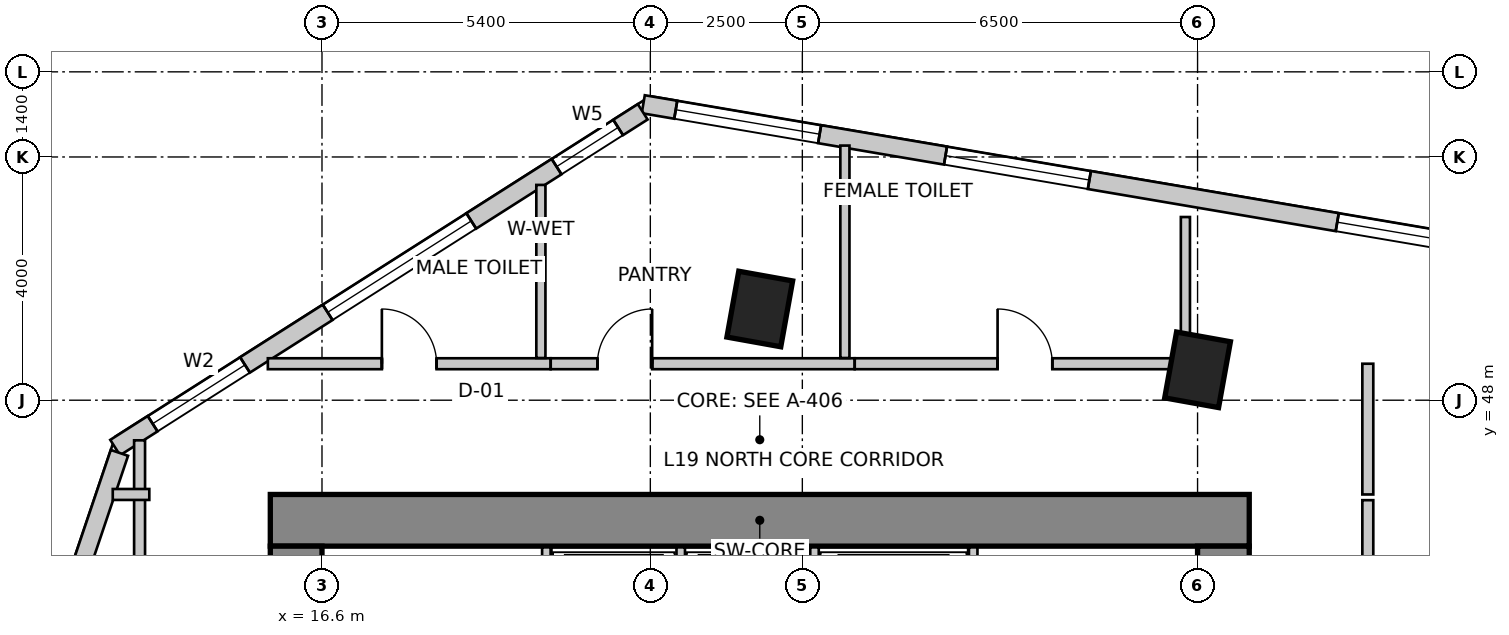
"""IFC4 building model, lengths in metres.
Left out: names, types, materials, properties, quantities, classifications, styles, units other than length and angle.
Written with IfcOpenShell. Run it as: python <this file> out.ifc"""

import sys

from ifc_helpers import new_model, si_unit, direction, frame, frame_2d, origin, origin_2d, place, context, subcontext, project, spatial, rectangle, extrude, source, transform, mapped, element, fill, save


model = new_model("IFC4")
c1 = context("Model", 3, precision=1e-05, world=origin(), true_north=direction((0.0, 1.0)))
c2 = subcontext(c1, "Body", "Model", "MODEL_VIEW")
j1 = project(units=[si_unit("LENGTHUNIT", "METRE"), si_unit("PLANEANGLEUNIT", "RADIAN")], contexts=[c1])
p1 = place(None, origin())
s1 = spatial("IfcSite", under=j1, at=p1, CompositionType="ELEMENT")
p2 = place(p1, origin())
s2 = spatial("IfcBuilding", under=s1, at=p2, CompositionType="ELEMENT")
p3 = place(p2, frame((0.0, 0.0, 79.0)))
s3 = spatial("IfcBuildingStorey", under=s2, at=p3, CompositionType="ELEMENT", Elevation=79.0)
p4 = place(p3, frame((15.75, 46.025, 0.0), z_axis=(0.0, 0.0, 1.0), x_axis=(1.0, 0.0, 0.0)))
e1 = element("IfcWall", 1, at=p4, inside=s3, PredefinedType="SHEAR", context=c2, shape_type="SweptSolid", body=[
    extrude(rectangle(XDim=16.1, YDim=0.85, at=frame_2d((8.05, 0.0))), origin(), (0.0, 0.0, 1.0), 4.0),
])
p5 = place(p3, frame((16.175, 34.2, 0.0), z_axis=(0.0, 0.0, 1.0), x_axis=(0.0, 1.0, 0.0)))
e2 = element("IfcWall", 2, at=p5, inside=s3, PredefinedType="SHEAR", context=c2, shape_type="SweptSolid", body=[
    extrude(rectangle(XDim=11.4, YDim=0.85, at=frame_2d((5.7, 0.0))), origin(), (0.0, 0.0, 1.0), 4.0),
])
m1 = source(origin(), c2, "Body", "SweptSolid", [
    extrude(rectangle(XDim=1.1, YDim=2.15, at=frame_2d((0.55, 1.075))), frame((0.0, 0.435, 0.0), z_axis=(0.0, -1.0, 0.0), x_axis=(1.0, 0.0, 0.0)), (0.0, 0.0, 1.0), 0.87),
])
p6 = place(p5, frame((7.15, 0.0, 0.0)))
e3 = element("IfcOpeningElement", 3, at=p6, cuts=e2, PredefinedType="OPENING", context=c2, shape_type="MappedRepresentation", body=[
    mapped(m1, transform((0.0, 0.0, 0.0), scale=1.0)),
])
p7 = place(p3, frame((31.425, 34.2, 0.0), z_axis=(0.0, 0.0, 1.0), x_axis=(0.0, 1.0, 0.0)))
e4 = element("IfcWall", 4, at=p7, inside=s3, PredefinedType="SHEAR", context=c2, shape_type="SweptSolid", body=[
    extrude(rectangle(XDim=11.4, YDim=0.85, at=frame_2d((5.7, 0.0))), origin(), (0.0, 0.0, 1.0), 4.0),
])
p8 = place(p7, frame((7.35, 0.0, 0.0)))
e5 = element("IfcOpeningElement", 5, at=p8, cuts=e4, PredefinedType="OPENING", context=c2, shape_type="MappedRepresentation", body=[
    mapped(m1, transform((0.0, 0.0, 0.0), scale=1.0)),
])
m2 = source(origin(), c2, "Body", "SweptSolid", [
    extrude(rectangle(XDim=0.9, YDim=1.1, at=origin_2d()), origin(), (0.0, 0.0, 1.0), 4.0),
])
for number, where, z_axis, x_axis in (
    (6, (23.8, 49.5, 0.0), (0.0, 0.0, 1.0), (0.984, -0.177, 0.0)),
    (7, (31.0, 48.5, 0.0), (0.0, 0.0, 1.0), (0.984, -0.177, 0.0)),
):
    element("IfcColumn", number, at=place(p3, frame(where, z_axis=z_axis, x_axis=x_axis)), inside=s3, PredefinedType="COLUMN", context=c2, shape_type="MappedRepresentation", body=[
        mapped(m2, transform((0.0, 0.0, 0.0), scale=1.0)),
    ])
p9 = place(p3, frame((53.961, 47.417, 0.0), z_axis=(0.0, 0.0, 1.0), x_axis=(-0.985865713455, 0.167537443678, 0.0)))
e8 = element("IfcWall", 8, at=p9, inside=s3, PredefinedType="SOLIDWALL", context=c2, shape_type="SweptSolid", body=[
    extrude(rectangle(XDim=32.537, YDim=0.3, at=frame_2d((16.269, 0.0))), origin(), (0.0, 0.0, 1.0), 3.75),
])
m3 = source(origin(), c2, "Body", "SweptSolid", [
    extrude(rectangle(XDim=2.1, YDim=2.0, at=frame_2d((1.05, 1.0))), frame((0.0, 0.16, 0.0), z_axis=(0.0, -1.0, 0.0), x_axis=(1.0, 0.0, 0.0)), (0.0, 0.0, 1.0), 0.32),
])
p10 = place(p9, frame((0.525, 0.0, 0.85)))
e9 = element("IfcOpeningElement", 9, at=p10, cuts=e8, PredefinedType="OPENING", context=c2, shape_type="MappedRepresentation", body=[
    mapped(m3, transform((0.0, 0.0, 0.0), scale=1.0)),
])
m4 = source(origin(), c2, "Body", "SweptSolid", [
    extrude(rectangle(XDim=2.4, YDim=2.2, at=frame_2d((1.2, 1.1))), frame((0.0, 0.16, 0.0), z_axis=(0.0, -1.0, 0.0), x_axis=(1.0, 0.0, 0.0)), (0.0, 0.0, 1.0), 0.32),
])
p11 = place(p9, frame((4.022, 0.0, 0.85)))
e10 = element("IfcOpeningElement", 10, at=p11, cuts=e8, PredefinedType="OPENING", context=c2, shape_type="MappedRepresentation", body=[
    mapped(m4, transform((0.0, 0.0, 0.0), scale=1.0)),
])
p12 = place(p9, frame((8.368, 0.0, 0.85)))
e11 = element("IfcOpeningElement", 11, at=p12, cuts=e8, PredefinedType="OPENING", context=c2, shape_type="MappedRepresentation", body=[
    mapped(m4, transform((0.0, 0.0, 0.0), scale=1.0)),
])
p13 = place(p9, frame((12.713, 0.0, 0.85)))
e12 = element("IfcOpeningElement", 12, at=p13, cuts=e8, PredefinedType="OPENING", context=c2, shape_type="MappedRepresentation", body=[
    mapped(m4, transform((0.0, 0.0, 0.0), scale=1.0)),
])
p14 = place(p9, frame((18.56, 0.0, 0.85)))
e13 = element("IfcOpeningElement", 13, at=p14, cuts=e8, PredefinedType="OPENING", context=c2, shape_type="MappedRepresentation", body=[
    mapped(m4, transform((0.0, 0.0, 0.0), scale=1.0)),
])
p15 = place(p9, frame((25.095, 0.0, 0.85)))
e14 = element("IfcOpeningElement", 14, at=p15, cuts=e8, PredefinedType="OPENING", context=c2, shape_type="MappedRepresentation", body=[
    mapped(m4, transform((0.0, 0.0, 0.0), scale=1.0)),
])
p16 = place(p9, frame((29.595, 0.0, 0.85)))
e15 = element("IfcOpeningElement", 15, at=p16, cuts=e8, PredefinedType="OPENING", context=c2, shape_type="MappedRepresentation", body=[
    mapped(m4, transform((0.0, 0.0, 0.0), scale=1.0)),
])
p17 = place(p3, frame((21.875, 52.742, 0.0), z_axis=(0.0, 0.0, 1.0), x_axis=(-0.843662465249, -0.536873956092, 0.0)))
e16 = element("IfcWall", 16, at=p17, inside=s3, PredefinedType="SOLIDWALL", context=c2, shape_type="SweptSolid", body=[
    extrude(rectangle(XDim=10.284, YDim=0.3, at=frame_2d((5.142, 0.0))), origin(), (0.0, 0.0, 1.0), 3.75),
])
m5 = source(origin(), c2, "Body", "SweptSolid", [
    extrude(rectangle(XDim=1.2, YDim=1.6, at=frame_2d((0.6, 0.8))), frame((0.0, 0.16, 0.0), z_axis=(0.0, -1.0, 0.0), x_axis=(1.0, 0.0, 0.0)), (0.0, 0.0, 1.0), 0.32),
])
p18 = place(p17, frame((0.479, 0.0, 0.85)))
e17 = element("IfcOpeningElement", 17, at=p18, cuts=e16, PredefinedType="OPENING", context=c2, shape_type="MappedRepresentation", body=[
    mapped(m5, transform((0.0, 0.0, 0.0), scale=1.0)),
])
m6 = source(origin(), c2, "Body", "SweptSolid", [
    extrude(rectangle(XDim=2.8, YDim=2.4, at=frame_2d((1.4, 1.2))), frame((0.0, 0.16, 0.0), z_axis=(0.0, -1.0, 0.0), x_axis=(1.0, 0.0, 0.0)), (0.0, 0.0, 1.0), 0.32),
])
p19 = place(p17, frame((3.342, 0.0, 0.85)))
e18 = element("IfcOpeningElement", 18, at=p19, cuts=e16, PredefinedType="OPENING", context=c2, shape_type="MappedRepresentation", body=[
    mapped(m6, transform((0.0, 0.0, 0.0), scale=1.0)),
])
m7 = source(origin(), c2, "Body", "SweptSolid", [
    extrude(rectangle(XDim=1.8, YDim=2.1, at=frame_2d((0.9, 1.05))), frame((0.0, 0.16, 0.0), z_axis=(0.0, -1.0, 0.0), x_axis=(1.0, 0.0, 0.0)), (0.0, 0.0, 1.0), 0.32),
])
p20 = place(p17, frame((7.753, 0.0, 0.85)))
e19 = element("IfcOpeningElement", 19, at=p20, cuts=e16, PredefinedType="OPENING", context=c2, shape_type="MappedRepresentation", body=[
    mapped(m7, transform((0.0, 0.0, 0.0), scale=1.0)),
])
p21 = place(p3, frame((13.269, 47.134, 0.0), z_axis=(0.0, 0.0, 1.0), x_axis=(-0.319920423265, -0.947444416722, 0.0)))
e20 = element("IfcWall", 20, at=p21, inside=s3, PredefinedType="SOLIDWALL", context=c2, shape_type="SweptSolid", body=[
    extrude(rectangle(XDim=16.135, YDim=0.3, at=frame_2d((8.067, 0.0))), origin(), (0.0, 0.0, 1.0), 3.75),
])
p22 = place(p21, frame((2.188, 0.0, 0.85)))
e21 = element("IfcOpeningElement", 21, at=p22, cuts=e20, PredefinedType="OPENING", context=c2, shape_type="MappedRepresentation", body=[
    mapped(m4, transform((0.0, 0.0, 0.0), scale=1.0)),
])
p23 = place(p21, frame((6.959, 0.0, 0.85)))
e22 = element("IfcOpeningElement", 22, at=p23, cuts=e20, PredefinedType="OPENING", context=c2, shape_type="MappedRepresentation", body=[
    mapped(m6, transform((0.0, 0.0, 0.0), scale=1.0)),
])
p24 = place(p21, frame((12.13, 0.0, 0.85)))
e23 = element("IfcOpeningElement", 23, at=p24, cuts=e20, PredefinedType="OPENING", context=c2, shape_type="MappedRepresentation", body=[
    mapped(m4, transform((0.0, 0.0, 0.0), scale=1.0)),
])
for number, where, z_axis, x_axis in (
    (24, (20.29, 43.28, 0.0), (0.0, 0.0, 1.0), (0.0, 1.0, 0.0)),
    (25, (27.31, 43.28, 0.0), (0.0, 0.0, 1.0), (0.0, 1.0, 0.0)),
):
    element("IfcWall", number, at=place(p3, frame(where, z_axis=z_axis, x_axis=x_axis)), inside=s3, PredefinedType="SOLIDWALL", context=c2, shape_type="SweptSolid", body=[
        extrude(rectangle(XDim=2.3, YDim=0.14, at=frame_2d((1.15, 0.0))), origin(), (0.0, 0.0, 1.0), 3.75),
    ])
for number, where, z_axis, x_axis in (
    (26, (22.5, 43.02, 0.0), (0.0, 0.0, 1.0), (0.0, 1.0, 0.0)),
    (27, (24.7, 43.02, 0.0), (0.0, 0.0, 1.0), (0.0, 1.0, 0.0)),
):
    element("IfcWall", number, at=place(p3, frame(where, z_axis=z_axis, x_axis=x_axis)), inside=s3, PredefinedType="SOLIDWALL", context=c2, shape_type="SweptSolid", body=[
        extrude(rectangle(XDim=2.56, YDim=0.14, at=frame_2d((1.28, 0.0))), origin(), (0.0, 0.0, 1.0), 3.75),
    ])
p25 = place(p3, frame((13.6, 33.444, 0.0), z_axis=(0.0, 0.0, 1.0), x_axis=(0.0, 1.0, 0.0)))
e28 = element("IfcWall", 28, at=p25, inside=s3, PredefinedType="PARTITIONING", context=c2, shape_type="SweptSolid", body=[
    extrude(rectangle(XDim=13.896, YDim=0.18, at=frame_2d((6.948, 0.0))), origin(), (0.0, 0.0, 1.0), 2.892),
])
m8 = source(origin(), c2, "Body", "SweptSolid", [
    extrude(rectangle(XDim=0.9, YDim=2.15, at=frame_2d((0.45, 1.075))), frame((0.0, 0.1, 0.0), z_axis=(0.0, -1.0, 0.0), x_axis=(1.0, 0.0, 0.0)), (0.0, 0.0, 1.0), 0.2),
])
p26 = place(p25, frame((4.144, 0.0, 0.0)))
e29 = element("IfcOpeningElement", 29, at=p26, cuts=e28, PredefinedType="OPENING", context=c2, shape_type="MappedRepresentation", body=[
    mapped(m8, transform((0.0, 0.0, 0.0), scale=1.0)),
])
p27 = place(p3, frame((13.76, 46.45, 0.0), z_axis=(0.0, 0.0, 1.0), x_axis=(-1.0, 0.0, 0.0)))
e30 = element("IfcWall", 30, at=p27, inside=s3, PredefinedType="PARTITIONING", context=c2, shape_type="SweptSolid", body=[
    extrude(rectangle(XDim=0.601, YDim=0.18, at=frame_2d((0.301, 0.0))), origin(), (0.0, 0.0, 1.0), 3.75),
])
p28 = place(p3, frame((15.71, 48.6, 0.0), z_axis=(0.0, 0.0, 1.0), x_axis=(1.0, 0.0, 0.0)))
e31 = element("IfcWall", 31, at=p28, inside=s3, PredefinedType="PARTITIONING", context=c2, shape_type="SweptSolid", body=[
    extrude(rectangle(XDim=4.65, YDim=0.18, at=frame_2d((2.325, 0.0))), origin(), (0.0, 0.0, 1.0), 3.75),
])
p29 = place(p28, frame((1.875, 0.0, 0.0)))
e32 = element("IfcOpeningElement", 32, at=p29, cuts=e31, PredefinedType="OPENING", context=c2, shape_type="MappedRepresentation", body=[
    mapped(m8, transform((0.0, 0.0, 0.0), scale=1.0)),
])
p30 = place(p3, frame((20.362, 48.6, 0.0), z_axis=(0.0, 0.0, 1.0), x_axis=(1.0, 0.0, 0.0)))
e33 = element("IfcWall", 33, at=p30, inside=s3, PredefinedType="PARTITIONING", context=c2, shape_type="SweptSolid", body=[
    extrude(rectangle(XDim=4.998, YDim=0.18, at=frame_2d((2.499, 0.0))), origin(), (0.0, 0.0, 1.0), 3.419),
])
p31 = place(p30, frame((0.768, 0.0, 0.0)))
e34 = element("IfcOpeningElement", 34, at=p31, cuts=e33, PredefinedType="OPENING", context=c2, shape_type="MappedRepresentation", body=[
    mapped(m8, transform((0.0, 0.0, 0.0), scale=1.0)),
])
p32 = place(p3, frame((25.362, 48.6, 0.0), z_axis=(0.0, 0.0, 1.0), x_axis=(1.0, 0.0, 0.0)))
e35 = element("IfcWall", 35, at=p32, inside=s3, PredefinedType="PARTITIONING", context=c2, shape_type="SweptSolid", body=[
    extrude(rectangle(XDim=5.598, YDim=0.18, at=frame_2d((2.799, 0.0))), origin(), (0.0, 0.0, 1.0), 2.892),
])
p33 = place(p32, frame((2.349, 0.0, 0.0)))
e36 = element("IfcOpeningElement", 36, at=p33, cuts=e35, PredefinedType="OPENING", context=c2, shape_type="MappedRepresentation", body=[
    mapped(m8, transform((0.0, 0.0, 0.0), scale=1.0)),
])
p34 = place(p3, frame((33.8, 48.6, 0.0), z_axis=(0.0, 0.0, 1.0), x_axis=(0.0, -1.0, 0.0)))
e37 = element("IfcWall", 37, at=p34, inside=s3, PredefinedType="PARTITIONING", context=c2, shape_type="SweptSolid", body=[
    extrude(rectangle(XDim=2.15, YDim=0.18, at=frame_2d((1.075, 0.0))), origin(), (0.0, 0.0, 1.0), 2.892),
])
p35 = place(p3, frame((33.8, 46.356, 0.0), z_axis=(0.0, 0.0, 1.0), x_axis=(0.0, -1.0, 0.0)))
e38 = element("IfcWall", 38, at=p35, inside=s3, PredefinedType="PARTITIONING", context=c2, shape_type="SweptSolid", body=[
    extrude(rectangle(XDim=8.516, YDim=0.18, at=frame_2d((4.258, 0.0))), origin(), (0.0, 0.0, 1.0), 3.279),
])
p36 = place(p3, frame((20.2, 51.54, 0.0), z_axis=(0.0, 0.0, 1.0), x_axis=(0.0, -1.0, 0.0)))
e39 = element("IfcWall", 39, at=p36, inside=s3, PredefinedType="PARTITIONING", context=c2, shape_type="SweptSolid", body=[
    extrude(rectangle(XDim=2.846, YDim=0.15, at=frame_2d((1.423, 0.0))), origin(), (0.0, 0.0, 1.0), 3.75),
])
p37 = place(p3, frame((25.2, 52.188, 0.0), z_axis=(0.0, 0.0, 1.0), x_axis=(0.0, -1.0, 0.0)))
e40 = element("IfcWall", 40, at=p37, inside=s3, PredefinedType="PARTITIONING", context=c2, shape_type="SweptSolid", body=[
    extrude(rectangle(XDim=3.493, YDim=0.15, at=frame_2d((1.747, 0.0))), origin(), (0.0, 0.0, 1.0), 2.892),
])
p38 = place(p3, frame((30.8, 51.013, 0.0), z_axis=(0.0, 0.0, 1.0), x_axis=(0.0, -1.0, 0.0)))
e41 = element("IfcWall", 41, at=p38, inside=s3, PredefinedType="PARTITIONING", context=c2, shape_type="SweptSolid", body=[
    extrude(rectangle(XDim=2.193, YDim=0.15, at=frame_2d((1.096, 0.0))), origin(), (0.0, 0.0, 1.0), 3.75),
])
m9 = source(origin(), c2, "Body", "SweptSolid", [
    extrude(rectangle(XDim=2.4, YDim=2.2, at=frame_2d((1.2, 1.1))), frame((0.0, -0.015, 0.0), z_axis=(0.0, -1.0, 0.0), x_axis=(1.0, 0.0, 0.0)), (0.0, 0.0, 1.0), 0.06),
])
p39 = place(p14, origin())
e42 = element("IfcWindow", 42, at=p39, inside=s3, PartitioningType="SINGLE_PANEL", PredefinedType="WINDOW", context=c2, shape_type="MappedRepresentation", body=[
    mapped(m9, transform((0.0, 0.0, 0.0), scale=1.0)),
])
fill(e13, e42)
p40 = place(p15, origin())
e43 = element("IfcWindow", 43, at=p40, inside=s3, PartitioningType="SINGLE_PANEL", PredefinedType="WINDOW", context=c2, shape_type="MappedRepresentation", body=[
    mapped(m9, transform((0.0, 0.0, 0.0), scale=1.0)),
])
fill(e14, e43)
p41 = place(p16, origin())
e44 = element("IfcWindow", 44, at=p41, inside=s3, PartitioningType="SINGLE_PANEL", PredefinedType="WINDOW", context=c2, shape_type="MappedRepresentation", body=[
    mapped(m9, transform((0.0, 0.0, 0.0), scale=1.0)),
])
fill(e15, e44)
m10 = source(origin(), c2, "Body", "SweptSolid", [
    extrude(rectangle(XDim=1.2, YDim=1.6, at=frame_2d((0.6, 0.8))), frame((0.0, -0.015, 0.0), z_axis=(0.0, -1.0, 0.0), x_axis=(1.0, 0.0, 0.0)), (0.0, 0.0, 1.0), 0.06),
])
p42 = place(p18, origin())
e45 = element("IfcWindow", 45, at=p42, inside=s3, PartitioningType="SINGLE_PANEL", PredefinedType="WINDOW", context=c2, shape_type="MappedRepresentation", body=[
    mapped(m10, transform((0.0, 0.0, 0.0), scale=1.0)),
])
fill(e17, e45)
m11 = source(origin(), c2, "Body", "SweptSolid", [
    extrude(rectangle(XDim=2.8, YDim=2.4, at=frame_2d((1.4, 1.2))), frame((0.0, -0.015, 0.0), z_axis=(0.0, -1.0, 0.0), x_axis=(1.0, 0.0, 0.0)), (0.0, 0.0, 1.0), 0.06),
])
p43 = place(p19, origin())
e46 = element("IfcWindow", 46, at=p43, inside=s3, PartitioningType="SINGLE_PANEL", PredefinedType="WINDOW", context=c2, shape_type="MappedRepresentation", body=[
    mapped(m11, transform((0.0, 0.0, 0.0), scale=1.0)),
])
fill(e18, e46)
m12 = source(origin(), c2, "Body", "SweptSolid", [
    extrude(rectangle(XDim=1.8, YDim=2.1, at=frame_2d((0.9, 1.05))), frame((0.0, -0.015, 0.0), z_axis=(0.0, -1.0, 0.0), x_axis=(1.0, 0.0, 0.0)), (0.0, 0.0, 1.0), 0.06),
])
p44 = place(p20, origin())
e47 = element("IfcWindow", 47, at=p44, inside=s3, PartitioningType="SINGLE_PANEL", PredefinedType="WINDOW", context=c2, shape_type="MappedRepresentation", body=[
    mapped(m12, transform((0.0, 0.0, 0.0), scale=1.0)),
])
fill(e19, e47)
m13 = source(origin(), c2, "Body", "SweptSolid", [
    extrude(rectangle(XDim=0.9, YDim=2.15, at=frame_2d((0.45, 1.075))), frame((0.0, 0.025, 0.0), z_axis=(0.0, -1.0, 0.0), x_axis=(1.0, 0.0, 0.0)), (0.0, 0.0, 1.0), 0.05),
])
p45 = place(p29, origin())
e48 = element("IfcDoor", 48, at=p45, inside=s3, OperationType="SINGLE_SWING_LEFT", PredefinedType="DOOR", context=c2, shape_type="MappedRepresentation", body=[
    mapped(m13, transform((0.0, 0.0, 0.0), scale=1.0)),
])
fill(e32, e48)
p46 = place(p31, origin())
e49 = element("IfcDoor", 49, at=p46, inside=s3, OperationType="SINGLE_SWING_RIGHT", PredefinedType="DOOR", context=c2, shape_type="MappedRepresentation", body=[
    mapped(m13, transform((0.0, 0.0, 0.0), scale=1.0)),
])
fill(e34, e49)
p47 = place(p33, origin())
e50 = element("IfcDoor", 50, at=p47, inside=s3, OperationType="SINGLE_SWING_LEFT", PredefinedType="DOOR", context=c2, shape_type="MappedRepresentation", body=[
    mapped(m13, transform((0.0, 0.0, 0.0), scale=1.0)),
])
fill(e36, e50)
save(model, sys.argv[1])
